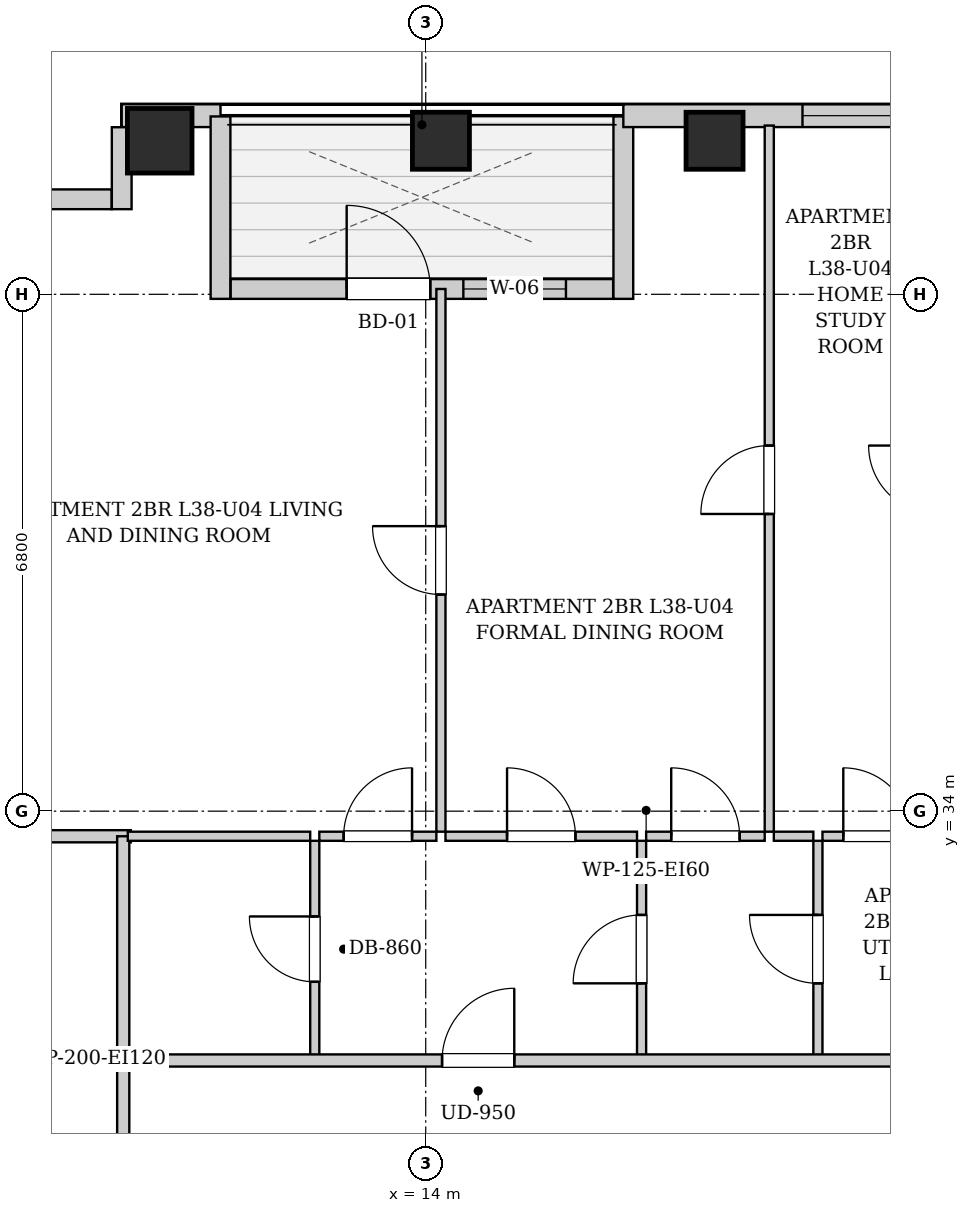
"""IFC4 building model, lengths in metres.
Left out: names, types, materials, properties, quantities, classifications, styles, units other than length and angle.
Written with IfcOpenShell. Run it as: python <this file> out.ifc"""

import sys

from ifc_helpers import new_model, si_unit, direction, frame, frame_2d, origin, origin_2d, place, context, subcontext, project, spatial, rectangle, extrude, element, fill, save


model = new_model("IFC4")
c1 = context("Model", 3, precision=1e-05, world=origin(), true_north=direction((0.0, 1.0)))
c2 = subcontext(c1, "Body", "Model", "MODEL_VIEW")
j1 = project(units=[si_unit("LENGTHUNIT", "METRE"), si_unit("PLANEANGLEUNIT", "RADIAN")], contexts=[c1])
p1 = place(None, origin())
s1 = spatial("IfcSite", under=j1, at=p1, CompositionType="ELEMENT")
p2 = place(p1, origin())
s2 = spatial("IfcBuilding", under=s1, at=p2, CompositionType="ELEMENT")
p3 = place(p2, frame((0.0, 0.0, 134.15)))
s3 = spatial("IfcBuildingStorey", under=s2, at=p3, CompositionType="ELEMENT", Elevation=134.15)
p4 = place(p3, frame((10.5, 42.82, 0.0), z_axis=(0.0, 0.0, 1.0), x_axis=(1.0, 0.0, 0.0)))
e1 = element("IfcColumn", 1, at=p4, inside=s3, PredefinedType="COLUMN", context=c2, shape_type="SweptSolid", body=[
    extrude(rectangle(XDim=0.85, YDim=0.85, at=origin_2d()), origin(), (0.0, 0.0, 1.0), 3.25),
])
for number, where, z_axis, x_axis in (
    (2, (14.2, 42.82, 0.0), (0.0, 0.0, 1.0), (1.0, 0.0, 0.0)),
    (3, (17.8, 42.82, 0.0), (0.0, 0.0, 1.0), (1.0, 0.0, 0.0)),
):
    element("IfcColumn", number, at=place(p3, frame(where, z_axis=z_axis, x_axis=x_axis)), inside=s3, PredefinedType="COLUMN", context=c2, shape_type="SweptSolid", body=[
        extrude(rectangle(XDim=0.75, YDim=0.75, at=origin_2d()), origin(), (0.0, 0.0, 1.0), 3.25),
    ])
p5 = place(p3, frame((10.0, 43.15, 0.0), z_axis=(0.0, 0.0, 1.0), x_axis=(1.0, 0.0, 0.0)))
e4 = element("IfcWall", 4, at=p5, inside=s3, PredefinedType="SOLIDWALL", context=c2, shape_type="SweptSolid", body=[
    extrude(rectangle(XDim=1.3, YDim=0.3, at=frame_2d((0.65, 0.0))), origin(), (0.0, 0.0, 1.0), 2.99),
])
p6 = place(p3, frame((11.3, 43.14, 0.0), z_axis=(0.0, 0.0, 1.0), x_axis=(0.0, -1.0, 0.0)))
e5 = element("IfcWall", 5, at=p6, inside=s3, PredefinedType="SOLIDWALL", context=c2, shape_type="SweptSolid", body=[
    extrude(rectangle(XDim=2.4, YDim=0.26, at=frame_2d((1.2, 0.0))), origin(), (0.0, 0.0, 1.0), 2.99),
])
p7 = place(p3, frame((11.434, 40.87, 0.0), z_axis=(0.0, 0.0, 1.0), x_axis=(1.0, 0.0, 0.0)))
e6 = element("IfcWall", 6, at=p7, inside=s3, PredefinedType="SOLIDWALL", context=c2, shape_type="SweptSolid", body=[
    extrude(rectangle(XDim=5.032, YDim=0.26, at=frame_2d((2.516, 0.0))), origin(), (0.0, 0.0, 1.0), 2.99),
])
p8 = place(p7, frame((1.526, 0.0, 0.0)))
e7 = element("IfcOpeningElement", 7, at=p8, cuts=e6, PredefinedType="OPENING", context=c2, shape_type="SweptSolid", body=[
    extrude(rectangle(XDim=1.1, YDim=2.0, at=frame_2d((0.55, 1.0))), frame((0.0, 0.14, 0.0), z_axis=(0.0, -1.0, 0.0), x_axis=(1.0, 0.0, 0.0)), (0.0, 0.0, 1.0), 0.28),
])
p9 = place(p7, frame((3.061, 0.0, 0.85)))
e8 = element("IfcOpeningElement", 8, at=p9, cuts=e6, PredefinedType="OPENING", context=c2, shape_type="SweptSolid", body=[
    extrude(rectangle(XDim=1.35, YDim=1.65, at=frame_2d((0.675, 0.825))), frame((0.0, 0.14, 0.0), z_axis=(0.0, -1.0, 0.0), x_axis=(1.0, 0.0, 0.0)), (0.0, 0.0, 1.0), 0.28),
])
p10 = place(p3, frame((16.6, 40.74, 0.0), z_axis=(0.0, 0.0, 1.0), x_axis=(0.0, 1.0, 0.0)))
e9 = element("IfcWall", 9, at=p10, inside=s3, PredefinedType="SOLIDWALL", context=c2, shape_type="SweptSolid", body=[
    extrude(rectangle(XDim=2.4, YDim=0.26, at=frame_2d((1.2, 0.0))), origin(), (0.0, 0.0, 1.0), 2.99),
])
p11 = place(p3, frame((16.6, 43.15, 0.0), z_axis=(0.0, 0.0, 1.0), x_axis=(1.0, 0.0, 0.0)))
e10 = element("IfcWall", 10, at=p11, inside=s3, PredefinedType="SOLIDWALL", context=c2, shape_type="SweptSolid", body=[
    extrude(rectangle(XDim=14.1, YDim=0.3, at=frame_2d((7.05, 0.0))), origin(), (0.0, 0.0, 1.0), 2.99),
])
p12 = place(p11, frame((2.357, 0.0, 0.55)))
e11 = element("IfcOpeningElement", 11, at=p12, cuts=e10, PredefinedType="OPENING", context=c2, shape_type="SweptSolid", body=[
    extrude(rectangle(XDim=1.35, YDim=1.2, at=frame_2d((0.675, 0.6))), frame((0.0, 0.16, 0.0), z_axis=(0.0, -1.0, 0.0), x_axis=(1.0, 0.0, 0.0)), (0.0, 0.0, 1.0), 0.32),
])
p13 = place(p11, frame((4.55, 0.0, 0.55)))
e12 = element("IfcOpeningElement", 12, at=p13, cuts=e10, PredefinedType="OPENING", context=c2, shape_type="SweptSolid", body=[
    extrude(rectangle(XDim=1.35, YDim=1.2, at=frame_2d((0.675, 0.6))), frame((0.0, 0.16, 0.0), z_axis=(0.0, -1.0, 0.0), x_axis=(1.0, 0.0, 0.0)), (0.0, 0.0, 1.0), 0.32),
])
p14 = place(p11, frame((10.9, 0.0, 0.55)))
e13 = element("IfcOpeningElement", 13, at=p14, cuts=e10, PredefinedType="OPENING", context=c2, shape_type="SweptSolid", body=[
    extrude(rectangle(XDim=1.35, YDim=1.2, at=frame_2d((0.675, 0.6))), frame((0.0, 0.16, 0.0), z_axis=(0.0, -1.0, 0.0), x_axis=(1.0, 0.0, 0.0)), (0.0, 0.0, 1.0), 0.32),
])
p15 = place(p11, frame((12.923, 0.0, 0.55)))
e14 = element("IfcOpeningElement", 14, at=p15, cuts=e10, PredefinedType="OPENING", context=c2, shape_type="SweptSolid", body=[
    extrude(rectangle(XDim=0.85, YDim=1.2, at=frame_2d((0.425, 0.6))), frame((0.0, 0.16, 0.0), z_axis=(0.0, -1.0, 0.0), x_axis=(1.0, 0.0, 0.0)), (0.0, 0.0, 1.0), 0.32),
])
p16 = place(p3, frame((8.882, 42.05, 0.0), z_axis=(0.0, 0.0, 1.0), x_axis=(1.0, 0.0, 0.0)))
e15 = element("IfcWall", 15, at=p16, inside=s3, PredefinedType="SOLIDWALL", context=c2, shape_type="SweptSolid", body=[
    extrude(rectangle(XDim=0.986, YDim=0.26, at=frame_2d((0.493, 0.0))), origin(), (0.0, 0.0, 1.0), 2.99),
])
p17 = place(p3, frame((10.0, 41.92, 0.0), z_axis=(0.0, 0.0, 1.0), x_axis=(0.0, 1.0, 0.0)))
e16 = element("IfcWall", 16, at=p17, inside=s3, PredefinedType="SOLIDWALL", context=c2, shape_type="SweptSolid", body=[
    extrude(rectangle(XDim=1.078, YDim=0.26, at=frame_2d((0.539, 0.0))), origin(), (0.0, 0.0, 1.0), 2.99),
])
p18 = place(p3, frame((10.02, 28.98, 0.0), z_axis=(0.0, 0.0, 1.0), x_axis=(0.0, 1.0, 0.0)))
e17 = element("IfcWall", 17, at=p18, inside=s3, PredefinedType="PARTITIONING", context=c2, shape_type="SweptSolid", body=[
    extrude(rectangle(XDim=1.74, YDim=0.16, at=frame_2d((0.87, 0.0))), origin(), (0.0, 0.0, 1.0), 2.99),
])
p19 = place(p3, frame((7.78, 33.67, 0.0), z_axis=(0.0, 0.0, 1.0), x_axis=(1.0, 0.0, 0.0)))
e18 = element("IfcWall", 18, at=p19, inside=s3, PredefinedType="PARTITIONING", context=c2, shape_type="SweptSolid", body=[
    extrude(rectangle(XDim=2.34, YDim=0.16, at=frame_2d((1.17, 0.0))), origin(), (0.0, 0.0, 1.0), 2.99),
])
p20 = place(p3, frame((10.02, 30.76, 0.0), z_axis=(0.0, 0.0, 1.0), x_axis=(0.0, 1.0, 0.0)))
e19 = element("IfcWall", 19, at=p20, inside=s3, PredefinedType="PARTITIONING", context=c2, shape_type="SweptSolid", body=[
    extrude(rectangle(XDim=2.91, YDim=0.16, at=frame_2d((1.455, 0.0))), origin(), (0.0, 0.0, 1.0), 2.99),
])
p21 = place(p3, frame((12.54, 30.76, 0.0), z_axis=(0.0, 0.0, 1.0), x_axis=(0.0, 1.0, 0.0)))
e20 = element("IfcWall", 20, at=p21, inside=s3, PredefinedType="PARTITIONING", context=c2, shape_type="SweptSolid", body=[
    extrude(rectangle(XDim=2.85, YDim=0.12, at=frame_2d((1.425, 0.0))), origin(), (0.0, 0.0, 1.0), 2.99),
])
p22 = place(p21, frame((0.995, 0.0, 0.0)))
e21 = element("IfcOpeningElement", 21, at=p22, cuts=e20, PredefinedType="OPENING", context=c2, shape_type="SweptSolid", body=[
    extrude(rectangle(XDim=0.86, YDim=2.05, at=frame_2d((0.43, 1.025))), frame((0.0, 0.07, 0.0), z_axis=(0.0, -1.0, 0.0), x_axis=(1.0, 0.0, 0.0)), (0.0, 0.0, 1.0), 0.14),
])
p23 = place(p3, frame((10.08, 33.67, 0.0), z_axis=(0.0, 0.0, 1.0), x_axis=(1.0, 0.0, 0.0)))
e22 = element("IfcWall", 22, at=p23, inside=s3, PredefinedType="PARTITIONING", context=c2, shape_type="SweptSolid", body=[
    extrude(rectangle(XDim=2.4, YDim=0.12, at=frame_2d((1.2, 0.0))), origin(), (0.0, 0.0, 1.0), 2.99),
])
p24 = place(p3, frame((16.84, 30.76, 0.0), z_axis=(0.0, 0.0, 1.0), x_axis=(0.0, 1.0, 0.0)))
e23 = element("IfcWall", 23, at=p24, inside=s3, PredefinedType="PARTITIONING", context=c2, shape_type="SweptSolid", body=[
    extrude(rectangle(XDim=2.85, YDim=0.12, at=frame_2d((1.425, 0.0))), origin(), (0.0, 0.0, 1.0), 2.99),
])
p25 = place(p24, frame((0.975, 0.0, 0.0)))
e24 = element("IfcOpeningElement", 24, at=p25, cuts=e23, PredefinedType="OPENING", context=c2, shape_type="SweptSolid", body=[
    extrude(rectangle(XDim=0.9, YDim=2.05, at=frame_2d((0.45, 1.025))), frame((0.0, 0.07, 0.0), z_axis=(0.0, -1.0, 0.0), x_axis=(1.0, 0.0, 0.0)), (0.0, 0.0, 1.0), 0.14),
])
p26 = place(p3, frame((12.6, 33.67, 0.0), z_axis=(0.0, 0.0, 1.0), x_axis=(1.0, 0.0, 0.0)))
e25 = element("IfcWall", 25, at=p26, inside=s3, PredefinedType="PARTITIONING", context=c2, shape_type="SweptSolid", body=[
    extrude(rectangle(XDim=1.54, YDim=0.12, at=frame_2d((0.77, 0.0))), origin(), (0.0, 0.0, 1.0), 2.99),
])
p27 = place(p26, frame((0.32, 0.0, 0.0)))
e26 = element("IfcOpeningElement", 26, at=p27, cuts=e25, PredefinedType="OPENING", context=c2, shape_type="SweptSolid", body=[
    extrude(rectangle(XDim=0.9, YDim=2.05, at=frame_2d((0.45, 1.025))), frame((0.0, 0.07, 0.0), z_axis=(0.0, -1.0, 0.0), x_axis=(1.0, 0.0, 0.0)), (0.0, 0.0, 1.0), 0.14),
])
p28 = place(p3, frame((14.26, 33.67, 0.0), z_axis=(0.0, 0.0, 1.0), x_axis=(1.0, 0.0, 0.0)))
e27 = element("IfcWall", 27, at=p28, inside=s3, PredefinedType="PARTITIONING", context=c2, shape_type="SweptSolid", body=[
    extrude(rectangle(XDim=2.52, YDim=0.12, at=frame_2d((1.26, 0.0))), origin(), (0.0, 0.0, 1.0), 2.99),
])
p29 = place(p28, frame((0.81, 0.0, 0.0)))
e28 = element("IfcOpeningElement", 28, at=p29, cuts=e27, PredefinedType="OPENING", context=c2, shape_type="SweptSolid", body=[
    extrude(rectangle(XDim=0.9, YDim=2.05, at=frame_2d((0.45, 1.025))), frame((0.0, 0.07, 0.0), z_axis=(0.0, -1.0, 0.0), x_axis=(1.0, 0.0, 0.0)), (0.0, 0.0, 1.0), 0.14),
])
p30 = place(p3, frame((19.16, 30.76, 0.0), z_axis=(0.0, 0.0, 1.0), x_axis=(0.0, 1.0, 0.0)))
e29 = element("IfcWall", 29, at=p30, inside=s3, PredefinedType="PARTITIONING", context=c2, shape_type="SweptSolid", body=[
    extrude(rectangle(XDim=2.85, YDim=0.12, at=frame_2d((1.425, 0.0))), origin(), (0.0, 0.0, 1.0), 2.99),
])
p31 = place(p30, frame((0.975, 0.0, 0.0)))
e30 = element("IfcOpeningElement", 30, at=p31, cuts=e29, PredefinedType="OPENING", context=c2, shape_type="SweptSolid", body=[
    extrude(rectangle(XDim=0.9, YDim=2.05, at=frame_2d((0.45, 1.025))), frame((0.0, 0.07, 0.0), z_axis=(0.0, -1.0, 0.0), x_axis=(1.0, 0.0, 0.0)), (0.0, 0.0, 1.0), 0.14),
])
p32 = place(p3, frame((16.9, 33.67, 0.0), z_axis=(0.0, 0.0, 1.0), x_axis=(1.0, 0.0, 0.0)))
e31 = element("IfcWall", 31, at=p32, inside=s3, PredefinedType="PARTITIONING", context=c2, shape_type="SweptSolid", body=[
    extrude(rectangle(XDim=1.56, YDim=0.12, at=frame_2d((0.78, 0.0))), origin(), (0.0, 0.0, 1.0), 2.99),
])
p33 = place(p32, frame((0.33, 0.0, 0.0)))
e32 = element("IfcOpeningElement", 32, at=p33, cuts=e31, PredefinedType="OPENING", context=c2, shape_type="SweptSolid", body=[
    extrude(rectangle(XDim=0.9, YDim=2.05, at=frame_2d((0.45, 1.025))), frame((0.0, 0.07, 0.0), z_axis=(0.0, -1.0, 0.0), x_axis=(1.0, 0.0, 0.0)), (0.0, 0.0, 1.0), 0.14),
])
p34 = place(p3, frame((18.58, 33.67, 0.0), z_axis=(0.0, 0.0, 1.0), x_axis=(1.0, 0.0, 0.0)))
e33 = element("IfcWall", 33, at=p34, inside=s3, PredefinedType="PARTITIONING", context=c2, shape_type="SweptSolid", body=[
    extrude(rectangle(XDim=0.52, YDim=0.12, at=frame_2d((0.26, 0.0))), origin(), (0.0, 0.0, 1.0), 2.99),
])
p35 = place(p3, frame((19.22, 33.67, 0.0), z_axis=(0.0, 0.0, 1.0), x_axis=(1.0, 0.0, 0.0)))
e34 = element("IfcWall", 34, at=p35, inside=s3, PredefinedType="PARTITIONING", context=c2, shape_type="SweptSolid", body=[
    extrude(rectangle(XDim=1.447, YDim=0.12, at=frame_2d((0.724, 0.0))), origin(), (0.0, 0.0, 1.0), 2.99),
])
p36 = place(p35, frame((0.274, 0.0, 0.0)))
e35 = element("IfcOpeningElement", 35, at=p36, cuts=e34, PredefinedType="OPENING", context=c2, shape_type="SweptSolid", body=[
    extrude(rectangle(XDim=0.9, YDim=2.05, at=frame_2d((0.45, 1.025))), frame((0.0, 0.07, 0.0), z_axis=(0.0, -1.0, 0.0), x_axis=(1.0, 0.0, 0.0)), (0.0, 0.0, 1.0), 0.14),
])
p37 = place(p3, frame((14.2, 33.73, 0.0), z_axis=(0.0, 0.0, 1.0), x_axis=(0.0, 1.0, 0.0)))
e36 = element("IfcWall", 36, at=p37, inside=s3, PredefinedType="PARTITIONING", context=c2, shape_type="SweptSolid", body=[
    extrude(rectangle(XDim=7.14, YDim=0.12, at=frame_2d((3.57, 0.0))), origin(), (0.0, 0.0, 1.0), 2.99),
])
p38 = place(p37, frame((3.12, 0.0, 0.0)))
e37 = element("IfcOpeningElement", 37, at=p38, cuts=e36, PredefinedType="OPENING", context=c2, shape_type="SweptSolid", body=[
    extrude(rectangle(XDim=0.9, YDim=2.05, at=frame_2d((0.45, 1.025))), frame((0.0, 0.07, 0.0), z_axis=(0.0, -1.0, 0.0), x_axis=(1.0, 0.0, 0.0)), (0.0, 0.0, 1.0), 0.14),
])
p39 = place(p3, frame((18.52, 33.73, 0.0), z_axis=(0.0, 0.0, 1.0), x_axis=(0.0, 1.0, 0.0)))
e38 = element("IfcWall", 38, at=p39, inside=s3, PredefinedType="PARTITIONING", context=c2, shape_type="SweptSolid", body=[
    extrude(rectangle(XDim=9.29, YDim=0.12, at=frame_2d((4.645, 0.0))), origin(), (0.0, 0.0, 1.0), 2.99),
])
p40 = place(p39, frame((4.18, 0.0, 0.0)))
e39 = element("IfcOpeningElement", 39, at=p40, cuts=e38, PredefinedType="OPENING", context=c2, shape_type="SweptSolid", body=[
    extrude(rectangle(XDim=0.9, YDim=2.05, at=frame_2d((0.45, 1.025))), frame((0.0, 0.07, 0.0), z_axis=(0.0, -1.0, 0.0), x_axis=(1.0, 0.0, 0.0)), (0.0, 0.0, 1.0), 0.14),
])
p41 = place(p3, frame((10.05, 30.72, 0.0), z_axis=(0.0, 0.0, 1.0), x_axis=(1.0, 0.0, 0.0)))
e40 = element("IfcWall", 40, at=p41, inside=s3, PredefinedType="PARTITIONING", context=c2, shape_type="SweptSolid", body=[
    extrude(rectangle(XDim=27.7, YDim=0.16, at=frame_2d((13.85, 0.0))), origin(), (0.0, 0.0, 1.0), 2.99),
])
p42 = place(p41, frame((4.165, 0.0, 0.0)))
e41 = element("IfcOpeningElement", 41, at=p42, cuts=e40, PredefinedType="OPENING", context=c2, shape_type="SweptSolid", body=[
    extrude(rectangle(XDim=0.95, YDim=2.1, at=frame_2d((0.475, 1.05))), frame((0.0, 0.09, 0.0), z_axis=(0.0, -1.0, 0.0), x_axis=(1.0, 0.0, 0.0)), (0.0, 0.0, 1.0), 0.18),
])
p43 = place(p41, frame((23.785, 0.0, 0.0)))
e42 = element("IfcOpeningElement", 42, at=p43, cuts=e40, PredefinedType="OPENING", context=c2, shape_type="SweptSolid", body=[
    extrude(rectangle(XDim=0.95, YDim=2.1, at=frame_2d((0.475, 1.05))), frame((0.0, 0.09, 0.0), z_axis=(0.0, -1.0, 0.0), x_axis=(1.0, 0.0, 0.0)), (0.0, 0.0, 1.0), 0.18),
])
p44 = place(p22, origin())
e43 = element("IfcDoor", 43, at=p44, inside=s3, OperationType="SINGLE_SWING_RIGHT", PredefinedType="DOOR", context=c2, shape_type="SweptSolid", body=[
    extrude(rectangle(XDim=0.86, YDim=2.05, at=frame_2d((0.43, 1.025))), frame((0.0, 0.025, 0.0), z_axis=(0.0, -1.0, 0.0), x_axis=(1.0, 0.0, 0.0)), (0.0, 0.0, 1.0), 0.05),
])
fill(e21, e43)
p45 = place(p25, origin())
e44 = element("IfcDoor", 44, at=p45, inside=s3, OperationType="SINGLE_SWING_LEFT", PredefinedType="DOOR", context=c2, shape_type="SweptSolid", body=[
    extrude(rectangle(XDim=0.9, YDim=2.05, at=frame_2d((0.45, 1.025))), frame((0.0, 0.025, 0.0), z_axis=(0.0, -1.0, 0.0), x_axis=(1.0, 0.0, 0.0)), (0.0, 0.0, 1.0), 0.05),
])
fill(e24, e44)
p46 = place(p27, origin())
e45 = element("IfcDoor", 45, at=p46, inside=s3, OperationType="SINGLE_SWING_RIGHT", PredefinedType="DOOR", context=c2, shape_type="SweptSolid", body=[
    extrude(rectangle(XDim=0.9, YDim=2.05, at=frame_2d((0.45, 1.025))), frame((0.0, 0.025, 0.0), z_axis=(0.0, -1.0, 0.0), x_axis=(1.0, 0.0, 0.0)), (0.0, 0.0, 1.0), 0.05),
])
fill(e26, e45)
p47 = place(p29, origin())
e46 = element("IfcDoor", 46, at=p47, inside=s3, OperationType="SINGLE_SWING_LEFT", PredefinedType="DOOR", context=c2, shape_type="SweptSolid", body=[
    extrude(rectangle(XDim=0.9, YDim=2.05, at=frame_2d((0.45, 1.025))), frame((0.0, 0.025, 0.0), z_axis=(0.0, -1.0, 0.0), x_axis=(1.0, 0.0, 0.0)), (0.0, 0.0, 1.0), 0.05),
])
fill(e28, e46)
p48 = place(p31, origin())
e47 = element("IfcDoor", 47, at=p48, inside=s3, OperationType="SINGLE_SWING_RIGHT", PredefinedType="DOOR", context=c2, shape_type="SweptSolid", body=[
    extrude(rectangle(XDim=0.9, YDim=2.05, at=frame_2d((0.45, 1.025))), frame((0.0, 0.025, 0.0), z_axis=(0.0, -1.0, 0.0), x_axis=(1.0, 0.0, 0.0)), (0.0, 0.0, 1.0), 0.05),
])
fill(e30, e47)
p49 = place(p33, origin())
e48 = element("IfcDoor", 48, at=p49, inside=s3, OperationType="SINGLE_SWING_LEFT", PredefinedType="DOOR", context=c2, shape_type="SweptSolid", body=[
    extrude(rectangle(XDim=0.9, YDim=2.05, at=frame_2d((0.45, 1.025))), frame((0.0, 0.025, 0.0), z_axis=(0.0, -1.0, 0.0), x_axis=(1.0, 0.0, 0.0)), (0.0, 0.0, 1.0), 0.05),
])
fill(e32, e48)
p50 = place(p36, origin())
e49 = element("IfcDoor", 49, at=p50, inside=s3, OperationType="SINGLE_SWING_LEFT", PredefinedType="DOOR", context=c2, shape_type="SweptSolid", body=[
    extrude(rectangle(XDim=0.9, YDim=2.05, at=frame_2d((0.45, 1.025))), frame((0.0, 0.025, 0.0), z_axis=(0.0, -1.0, 0.0), x_axis=(1.0, 0.0, 0.0)), (0.0, 0.0, 1.0), 0.05),
])
fill(e35, e49)
p51 = place(p38, origin())
e50 = element("IfcDoor", 50, at=p51, inside=s3, OperationType="SINGLE_SWING_RIGHT", PredefinedType="DOOR", context=c2, shape_type="SweptSolid", body=[
    extrude(rectangle(XDim=0.9, YDim=2.05, at=frame_2d((0.45, 1.025))), frame((0.0, 0.025, 0.0), z_axis=(0.0, -1.0, 0.0), x_axis=(1.0, 0.0, 0.0)), (0.0, 0.0, 1.0), 0.05),
])
fill(e37, e50)
p52 = place(p40, origin())
e51 = element("IfcDoor", 51, at=p52, inside=s3, OperationType="SINGLE_SWING_LEFT", PredefinedType="DOOR", context=c2, shape_type="SweptSolid", body=[
    extrude(rectangle(XDim=0.9, YDim=2.05, at=frame_2d((0.45, 1.025))), frame((0.0, 0.025, 0.0), z_axis=(0.0, -1.0, 0.0), x_axis=(1.0, 0.0, 0.0)), (0.0, 0.0, 1.0), 0.05),
])
fill(e39, e51)
p53 = place(p42, origin())
e52 = element("IfcDoor", 52, at=p53, inside=s3, OperationType="SINGLE_SWING_RIGHT", PredefinedType="DOOR", context=c2, shape_type="SweptSolid", body=[
    extrude(rectangle(XDim=0.95, YDim=2.1, at=frame_2d((0.475, 1.05))), frame((0.0, 0.025, 0.0), z_axis=(0.0, -1.0, 0.0), x_axis=(1.0, 0.0, 0.0)), (0.0, 0.0, 1.0), 0.05),
])
fill(e41, e52)
p54 = place(p8, origin())
e53 = element("IfcDoor", 53, at=p54, inside=s3, OperationType="SINGLE_SWING_LEFT", PredefinedType="DOOR", context=c2, shape_type="SweptSolid", body=[
    extrude(rectangle(XDim=1.1, YDim=2.0, at=frame_2d((0.55, 1.0))), frame((0.0, 0.025, 0.0), z_axis=(0.0, -1.0, 0.0), x_axis=(1.0, 0.0, 0.0)), (0.0, 0.0, 1.0), 0.05),
])
fill(e7, e53)
p55 = place(p9, origin())
e54 = element("IfcWindow", 54, at=p55, inside=s3, PartitioningType="SINGLE_PANEL", PredefinedType="WINDOW", context=c2, shape_type="SweptSolid", body=[
    extrude(rectangle(XDim=1.35, YDim=1.65, at=frame_2d((0.675, 0.825))), frame((0.0, 0.03, 0.0), z_axis=(0.0, -1.0, 0.0), x_axis=(1.0, 0.0, 0.0)), (0.0, 0.0, 1.0), 0.06),
])
fill(e8, e54)
p56 = place(p12, origin())
e55 = element("IfcWindow", 55, at=p56, inside=s3, PartitioningType="SINGLE_PANEL", PredefinedType="WINDOW", context=c2, shape_type="SweptSolid", body=[
    extrude(rectangle(XDim=1.35, YDim=1.2, at=frame_2d((0.675, 0.6))), frame((0.0, 0.03, 0.0), z_axis=(0.0, -1.0, 0.0), x_axis=(1.0, 0.0, 0.0)), (0.0, 0.0, 1.0), 0.06),
])
fill(e11, e55)
save(model, sys.argv[1])
